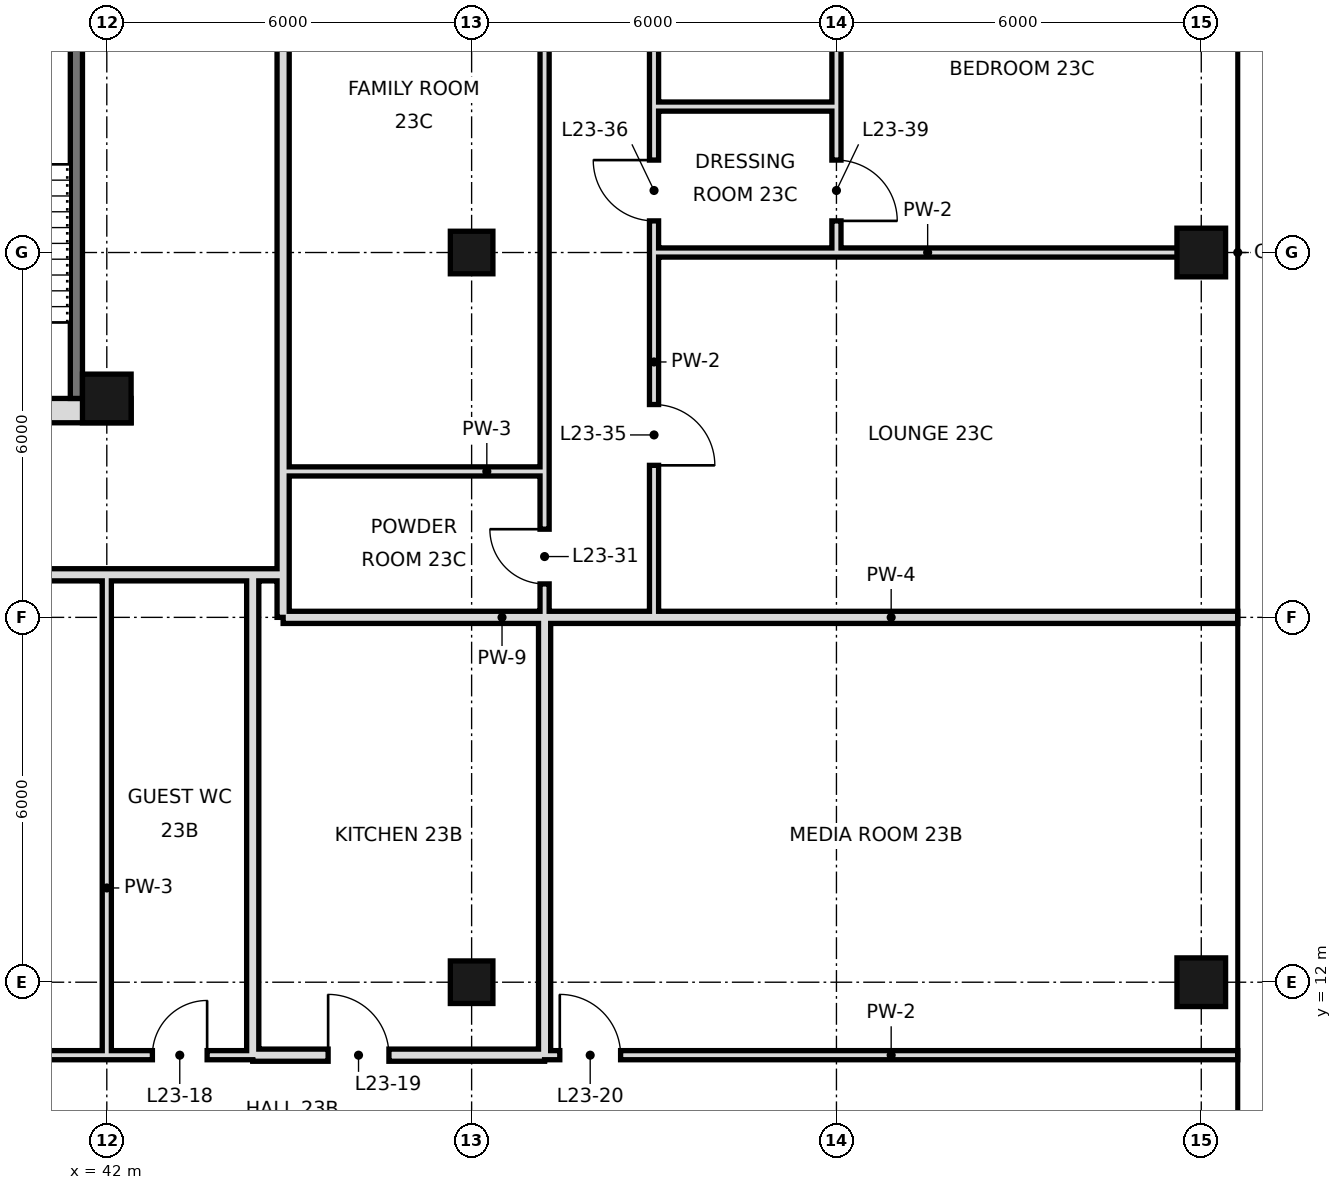
"""IFC4 building model, lengths in metres.
Left out: names, types, materials, properties, quantities, classifications, styles, units other than length and angle.
Written with IfcOpenShell. Run it as: python <this file> out.ifc"""

import sys

from ifc_helpers import new_model, si_unit, direction, frame, frame_2d, origin, origin_2d, place, context, subcontext, project, spatial, rectangle, hollow_rectangle, extrude, element, fill, save


model = new_model("IFC4")
c1 = context("Model", 3, precision=1e-05, world=origin(), true_north=direction((0.0, 1.0)))
c2 = subcontext(c1, "Body", "Model", "MODEL_VIEW")
j1 = project(units=[si_unit("LENGTHUNIT", "METRE"), si_unit("PLANEANGLEUNIT", "RADIAN")], contexts=[c1])
p1 = place(None, origin())
s1 = spatial("IfcSite", under=j1, at=p1, CompositionType="ELEMENT")
p2 = place(p1, origin())
s2 = spatial("IfcBuilding", under=s1, at=p2, CompositionType="ELEMENT")
p3 = place(p2, frame((0.0, 0.0, 107.0)))
s3 = spatial("IfcBuildingStorey", under=s2, at=p3, CompositionType="ELEMENT", Elevation=107.0)
p4 = place(p3, frame((42.0, 21.6, 0.0), z_axis=(0.0, 0.0, 1.0), x_axis=(1.0, 0.0, 0.0)))
e1 = element("IfcColumn", 1, at=p4, inside=s3, PredefinedType="COLUMN", context=c2, shape_type="SweptSolid", body=[
    extrude(hollow_rectangle(XDim=0.8, YDim=0.8, WallThickness=0.05, at=origin_2d()), origin(), (0.0, 0.0, 1.0), 3.6),
])
for number, where, z_axis, x_axis in (
    (2, (48.0, 12.0, 0.0), (0.0, 0.0, 1.0), (1.0, 0.0, 0.0)),
    (3, (48.0, 24.0, 0.0), (0.0, 0.0, 1.0), (1.0, 0.0, 0.0)),
):
    element("IfcColumn", number, at=place(p3, frame(where, z_axis=z_axis, x_axis=x_axis)), inside=s3, PredefinedType="COLUMN", context=c2, shape_type="SweptSolid", body=[
        extrude(hollow_rectangle(XDim=0.7, YDim=0.7, WallThickness=0.036, at=origin_2d()), origin(), (0.0, 0.0, 1.0), 3.6),
    ])
for number, where, z_axis, x_axis in (
    (4, (60.0, 12.0, 0.0), (0.0, 0.0, 1.0), (1.0, 0.0, 0.0)),
    (5, (60.0, 24.0, 0.0), (0.0, 0.0, 1.0), (1.0, 0.0, 0.0)),
):
    element("IfcColumn", number, at=place(p3, frame(where, z_axis=z_axis, x_axis=x_axis)), inside=s3, PredefinedType="COLUMN", context=c2, shape_type="SweptSolid", body=[
        extrude(hollow_rectangle(XDim=0.8, YDim=0.8, WallThickness=0.04, at=origin_2d()), origin(), (0.0, 0.0, 1.0), 3.6),
    ])
p5 = place(p3, frame((42.0, 10.8, 0.0), z_axis=(0.0, 0.0, 1.0), x_axis=(0.0, 1.0, 0.0)))
e6 = element("IfcWall", 6, at=p5, inside=s3, PredefinedType="PARTITIONING", context=c2, shape_type="SweptSolid", body=[
    extrude(rectangle(XDim=7.9, YDim=0.15, at=frame_2d((3.95, 0.0))), origin(), (0.0, 0.0, 1.0), 2.72),
])
p6 = place(p3, frame((44.4, 10.8, 0.0), z_axis=(0.0, 0.0, 1.0), x_axis=(0.0, 1.0, 0.0)))
e7 = element("IfcWall", 7, at=p6, inside=s3, PredefinedType="SOLIDWALL", context=c2, shape_type="SweptSolid", body=[
    extrude(rectangle(XDim=7.9, YDim=0.2, at=frame_2d((3.95, 0.0))), origin(), (0.0, 0.0, 1.0), 2.72),
])
p7 = place(p3, frame((44.9, 18.7, 0.0), z_axis=(0.0, 0.0, 1.0), x_axis=(0.0, 1.0, 0.0)))
e8 = element("IfcWall", 8, at=p7, inside=s3, PredefinedType="SOLIDWALL", context=c2, shape_type="SweptSolid", body=[
    extrude(rectangle(XDim=19.7, YDim=0.2, at=frame_2d((9.85, 0.0))), origin(), (0.0, 0.0, 1.0), 2.97),
])
p8 = place(p7, frame((16.96, 0.0, 0.0)))
e9 = element("IfcOpeningElement", 9, at=p8, cuts=e8, PredefinedType="OPENING", context=c2, shape_type="SweptSolid", body=[
    extrude(rectangle(XDim=1.2, YDim=2.4, at=frame_2d((0.6, 1.2))), frame((0.0, 0.11, 0.0), z_axis=(0.0, -1.0, 0.0), x_axis=(1.0, 0.0, 0.0)), (0.0, 0.0, 1.0), 0.22),
])
p9 = place(p3, frame((44.9, 18.0, 0.0), z_axis=(0.0, 0.0, 1.0), x_axis=(0.0, 1.0, 0.0)))
e10 = element("IfcWall", 10, at=p9, inside=s3, PredefinedType="SOLIDWALL", context=c2, shape_type="SweptSolid", body=[
    extrude(rectangle(XDim=0.7, YDim=0.2, at=frame_2d((0.35, 0.0))), origin(), (0.0, 0.0, 1.0), 2.97),
])
p10 = place(p3, frame((49.2, 10.8, 0.0), z_axis=(0.0, 0.0, 1.0), x_axis=(0.0, 1.0, 0.0)))
e11 = element("IfcWall", 11, at=p10, inside=s3, PredefinedType="SOLIDWALL", context=c2, shape_type="SweptSolid", body=[
    extrude(rectangle(XDim=7.2, YDim=0.2, at=frame_2d((3.6, 0.0))), origin(), (0.0, 0.0, 1.0), 2.72),
])
p11 = place(p3, frame((49.2, 20.4, 0.0), z_axis=(0.0, 0.0, 1.0), x_axis=(0.0, 1.0, 0.0)))
e12 = element("IfcWall", 12, at=p11, inside=s3, PredefinedType="PARTITIONING", context=c2, shape_type="SweptSolid", body=[
    extrude(rectangle(XDim=18.0, YDim=0.15, at=frame_2d((9.0, 0.0))), origin(), (0.0, 0.0, 1.0), 3.42),
])
p12 = place(p11, frame((13.6, 0.0, 0.0)))
e13 = element("IfcOpeningElement", 13, at=p12, cuts=e12, PredefinedType="OPENING", context=c2, shape_type="SweptSolid", body=[
    extrude(rectangle(XDim=1.0, YDim=2.4, at=frame_2d((0.5, 1.2))), frame((0.0, 0.085, 0.0), z_axis=(0.0, -1.0, 0.0), x_axis=(1.0, 0.0, 0.0)), (0.0, 0.0, 1.0), 0.17),
])
p13 = place(p11, frame((7.6, 0.0, 0.0)))
e14 = element("IfcOpeningElement", 14, at=p13, cuts=e12, PredefinedType="OPENING", context=c2, shape_type="SweptSolid", body=[
    extrude(rectangle(XDim=1.0, YDim=2.4, at=frame_2d((0.5, 1.2))), frame((0.0, 0.085, 0.0), z_axis=(0.0, -1.0, 0.0), x_axis=(1.0, 0.0, 0.0)), (0.0, 0.0, 1.0), 0.17),
])
p14 = place(p3, frame((49.2, 18.0, 0.0), z_axis=(0.0, 0.0, 1.0), x_axis=(0.0, 1.0, 0.0)))
e15 = element("IfcWall", 15, at=p14, inside=s3, PredefinedType="PARTITIONING", context=c2, shape_type="SweptSolid", body=[
    extrude(rectangle(XDim=2.4, YDim=0.15, at=frame_2d((1.2, 0.0))), origin(), (0.0, 0.0, 1.0), 3.42),
])
p15 = place(p14, frame((0.55, 0.0, 0.0)))
e16 = element("IfcOpeningElement", 16, at=p15, cuts=e15, PredefinedType="OPENING", context=c2, shape_type="SweptSolid", body=[
    extrude(rectangle(XDim=0.9, YDim=2.4, at=frame_2d((0.45, 1.2))), frame((0.0, 0.085, 0.0), z_axis=(0.0, -1.0, 0.0), x_axis=(1.0, 0.0, 0.0)), (0.0, 0.0, 1.0), 0.17),
])
p16 = place(p3, frame((51.0, 18.0, 0.0), z_axis=(0.0, 0.0, 1.0), x_axis=(0.0, 1.0, 0.0)))
e17 = element("IfcWall", 17, at=p16, inside=s3, PredefinedType="PARTITIONING", context=c2, shape_type="SweptSolid", body=[
    extrude(rectangle(XDim=8.4, YDim=0.15, at=frame_2d((4.2, 0.0))), origin(), (0.0, 0.0, 1.0), 3.42),
])
p17 = place(p16, frame((2.5, 0.0, 0.0)))
e18 = element("IfcOpeningElement", 18, at=p17, cuts=e17, PredefinedType="OPENING", context=c2, shape_type="SweptSolid", body=[
    extrude(rectangle(XDim=1.0, YDim=2.4, at=frame_2d((0.5, 1.2))), frame((0.0, 0.085, 0.0), z_axis=(0.0, -1.0, 0.0), x_axis=(1.0, 0.0, 0.0)), (0.0, 0.0, 1.0), 0.17),
])
p18 = place(p16, frame((6.52, 0.0, 0.0)))
e19 = element("IfcOpeningElement", 19, at=p18, cuts=e17, PredefinedType="OPENING", context=c2, shape_type="SweptSolid", body=[
    extrude(rectangle(XDim=1.0, YDim=2.4, at=frame_2d((0.5, 1.2))), frame((0.0, 0.085, 0.0), z_axis=(0.0, -1.0, 0.0), x_axis=(1.0, 0.0, 0.0)), (0.0, 0.0, 1.0), 0.17),
])
p19 = place(p3, frame((51.0, 26.4, 0.0), z_axis=(0.0, 0.0, 1.0), x_axis=(0.0, 1.0, 0.0)))
e20 = element("IfcWall", 20, at=p19, inside=s3, PredefinedType="PARTITIONING", context=c2, shape_type="SweptSolid", body=[
    extrude(rectangle(XDim=6.0, YDim=0.15, at=frame_2d((3.0, 0.0))), origin(), (0.0, 0.0, 1.0), 3.42),
])
p20 = place(p3, frame((54.0, 24.0, 0.0), z_axis=(0.0, 0.0, 1.0), x_axis=(0.0, 1.0, 0.0)))
e21 = element("IfcWall", 21, at=p20, inside=s3, PredefinedType="PARTITIONING", context=c2, shape_type="SweptSolid", body=[
    extrude(rectangle(XDim=2.4, YDim=0.15, at=frame_2d((1.2, 0.0))), origin(), (0.0, 0.0, 1.0), 3.42),
])
p21 = place(p20, frame((0.52, 0.0, 0.0)))
e22 = element("IfcOpeningElement", 22, at=p21, cuts=e21, PredefinedType="OPENING", context=c2, shape_type="SweptSolid", body=[
    extrude(rectangle(XDim=1.0, YDim=2.4, at=frame_2d((0.5, 1.2))), frame((0.0, 0.085, 0.0), z_axis=(0.0, -1.0, 0.0), x_axis=(1.0, 0.0, 0.0)), (0.0, 0.0, 1.0), 0.17),
])
p22 = place(p3, frame((54.0, 26.4, 0.0), z_axis=(0.0, 0.0, 1.0), x_axis=(0.0, 1.0, 0.0)))
e23 = element("IfcWall", 23, at=p22, inside=s3, PredefinedType="PARTITIONING", context=c2, shape_type="SweptSolid", body=[
    extrude(rectangle(XDim=6.0, YDim=0.15, at=frame_2d((3.0, 0.0))), origin(), (0.0, 0.0, 1.0), 3.42),
])
p23 = place(p22, frame((1.79, 0.0, 0.0)))
e24 = element("IfcOpeningElement", 24, at=p23, cuts=e23, PredefinedType="OPENING", context=c2, shape_type="SweptSolid", body=[
    extrude(rectangle(XDim=0.9, YDim=2.4, at=frame_2d((0.45, 1.2))), frame((0.0, 0.085, 0.0), z_axis=(0.0, -1.0, 0.0), x_axis=(1.0, 0.0, 0.0)), (0.0, 0.0, 1.0), 0.17),
])
p24 = place(p22, frame((4.35, 0.0, 0.0)))
e25 = element("IfcOpeningElement", 25, at=p24, cuts=e23, PredefinedType="OPENING", context=c2, shape_type="SweptSolid", body=[
    extrude(rectangle(XDim=0.9, YDim=2.4, at=frame_2d((0.45, 1.2))), frame((0.0, 0.085, 0.0), z_axis=(0.0, -1.0, 0.0), x_axis=(1.0, 0.0, 0.0)), (0.0, 0.0, 1.0), 0.17),
])
p25 = place(p3, frame((44.4, 10.8, 0.0), z_axis=(0.0, 0.0, 1.0), x_axis=(1.0, 0.0, 0.0)))
e26 = element("IfcWall", 26, at=p25, inside=s3, PredefinedType="SOLIDWALL", context=c2, shape_type="SweptSolid", body=[
    extrude(rectangle(XDim=4.8, YDim=0.2, at=frame_2d((2.4, 0.0))), origin(), (0.0, 0.0, 1.0), 2.72),
])
p26 = place(p25, frame((1.24, 0.0, 0.0)))
e27 = element("IfcOpeningElement", 27, at=p26, cuts=e26, PredefinedType="OPENING", context=c2, shape_type="SweptSolid", body=[
    extrude(rectangle(XDim=1.0, YDim=2.4, at=frame_2d((0.5, 1.2))), frame((0.0, 0.11, 0.0), z_axis=(0.0, -1.0, 0.0), x_axis=(1.0, 0.0, 0.0)), (0.0, 0.0, 1.0), 0.22),
])
p27 = place(p3, frame((24.0, 10.8, 0.0), z_axis=(0.0, 0.0, 1.0), x_axis=(1.0, 0.0, 0.0)))
e28 = element("IfcWall", 28, at=p27, inside=s3, PredefinedType="PARTITIONING", context=c2, shape_type="SweptSolid", body=[
    extrude(rectangle(XDim=18.0, YDim=0.15, at=frame_2d((9.0, 0.0))), origin(), (0.0, 0.0, 1.0), 3.42),
])
p28 = place(p27, frame((2.5, 0.0, 0.0)))
e29 = element("IfcOpeningElement", 29, at=p28, cuts=e28, PredefinedType="OPENING", context=c2, shape_type="SweptSolid", body=[
    extrude(rectangle(XDim=1.0, YDim=2.4, at=frame_2d((0.5, 1.2))), frame((0.0, 0.085, 0.0), z_axis=(0.0, -1.0, 0.0), x_axis=(1.0, 0.0, 0.0)), (0.0, 0.0, 1.0), 0.17),
])
p29 = place(p27, frame((15.4, 0.0, 0.0)))
e30 = element("IfcOpeningElement", 30, at=p29, cuts=e28, PredefinedType="OPENING", context=c2, shape_type="SweptSolid", body=[
    extrude(rectangle(XDim=1.0, YDim=2.4, at=frame_2d((0.5, 1.2))), frame((0.0, 0.085, 0.0), z_axis=(0.0, -1.0, 0.0), x_axis=(1.0, 0.0, 0.0)), (0.0, 0.0, 1.0), 0.17),
])
p30 = place(p27, frame((8.55, 0.0, 0.0)))
e31 = element("IfcOpeningElement", 31, at=p30, cuts=e28, PredefinedType="OPENING", context=c2, shape_type="SweptSolid", body=[
    extrude(rectangle(XDim=0.9, YDim=2.1, at=frame_2d((0.45, 1.05))), frame((0.0, 0.085, 0.0), z_axis=(0.0, -1.0, 0.0), x_axis=(1.0, 0.0, 0.0)), (0.0, 0.0, 1.0), 0.17),
])
p31 = place(p3, frame((49.2, 10.8, 0.0), z_axis=(0.0, 0.0, 1.0), x_axis=(1.0, 0.0, 0.0)))
e32 = element("IfcWall", 32, at=p31, inside=s3, PredefinedType="PARTITIONING", context=c2, shape_type="SweptSolid", body=[
    extrude(rectangle(XDim=11.4, YDim=0.15, at=frame_2d((5.7, 0.0))), origin(), (0.0, 0.0, 1.0), 3.42),
])
p32 = place(p31, frame((0.25, 0.0, 0.0)))
e33 = element("IfcOpeningElement", 33, at=p32, cuts=e32, PredefinedType="OPENING", context=c2, shape_type="SweptSolid", body=[
    extrude(rectangle(XDim=1.0, YDim=2.4, at=frame_2d((0.5, 1.2))), frame((0.0, 0.085, 0.0), z_axis=(0.0, -1.0, 0.0), x_axis=(1.0, 0.0, 0.0)), (0.0, 0.0, 1.0), 0.17),
])
p33 = place(p3, frame((42.0, 10.8, 0.0), z_axis=(0.0, 0.0, 1.0), x_axis=(1.0, 0.0, 0.0)))
e34 = element("IfcWall", 34, at=p33, inside=s3, PredefinedType="PARTITIONING", context=c2, shape_type="SweptSolid", body=[
    extrude(rectangle(XDim=2.4, YDim=0.15, at=frame_2d((1.2, 0.0))), origin(), (0.0, 0.0, 1.0), 3.42),
])
p34 = place(p33, frame((0.75, 0.0, 0.0)))
e35 = element("IfcOpeningElement", 35, at=p34, cuts=e34, PredefinedType="OPENING", context=c2, shape_type="SweptSolid", body=[
    extrude(rectangle(XDim=0.9, YDim=2.4, at=frame_2d((0.45, 1.2))), frame((0.0, 0.085, 0.0), z_axis=(0.0, -1.0, 0.0), x_axis=(1.0, 0.0, 0.0)), (0.0, 0.0, 1.0), 0.17),
])
p35 = place(p3, frame((44.9, 18.0, 0.0), z_axis=(0.0, 0.0, 1.0), x_axis=(1.0, 0.0, 0.0)))
e36 = element("IfcWall", 36, at=p35, inside=s3, PredefinedType="SOLIDWALL", context=c2, shape_type="SweptSolid", body=[
    extrude(rectangle(XDim=4.3, YDim=0.2, at=frame_2d((2.15, 0.0))), origin(), (0.0, 0.0, 1.0), 2.72),
])
p36 = place(p3, frame((49.2, 18.0, 0.0), z_axis=(0.0, 0.0, 1.0), x_axis=(1.0, 0.0, 0.0)))
e37 = element("IfcWall", 37, at=p36, inside=s3, PredefinedType="SOLIDWALL", context=c2, shape_type="SweptSolid", body=[
    extrude(rectangle(XDim=11.4, YDim=0.2, at=frame_2d((5.7, 0.0))), origin(), (0.0, 0.0, 1.0), 2.72),
])
p37 = place(p3, frame((21.6, 18.7, 0.0), z_axis=(0.0, 0.0, 1.0), x_axis=(1.0, 0.0, 0.0)))
e38 = element("IfcWall", 38, at=p37, inside=s3, PredefinedType="SOLIDWALL", context=c2, shape_type="SweptSolid", body=[
    extrude(rectangle(XDim=22.8, YDim=0.2, at=frame_2d((11.4, 0.0))), origin(), (0.0, 0.0, 1.0), 2.72),
])
p38 = place(p37, frame((4.8, 0.0, 0.0)))
e39 = element("IfcOpeningElement", 39, at=p38, cuts=e38, PredefinedType="OPENING", context=c2, shape_type="SweptSolid", body=[
    extrude(rectangle(XDim=1.2, YDim=2.4, at=frame_2d((0.6, 1.2))), frame((0.0, 0.11, 0.0), z_axis=(0.0, -1.0, 0.0), x_axis=(1.0, 0.0, 0.0)), (0.0, 0.0, 1.0), 0.22),
])
p39 = place(p37, frame((16.8, 0.0, 0.0)))
e40 = element("IfcOpeningElement", 40, at=p39, cuts=e38, PredefinedType="OPENING", context=c2, shape_type="SweptSolid", body=[
    extrude(rectangle(XDim=1.2, YDim=2.4, at=frame_2d((0.6, 1.2))), frame((0.0, 0.11, 0.0), z_axis=(0.0, -1.0, 0.0), x_axis=(1.0, 0.0, 0.0)), (0.0, 0.0, 1.0), 0.22),
])
p40 = place(p3, frame((44.4, 18.7, 0.0), z_axis=(0.0, 0.0, 1.0), x_axis=(1.0, 0.0, 0.0)))
e41 = element("IfcWall", 41, at=p40, inside=s3, PredefinedType="SOLIDWALL", context=c2, shape_type="SweptSolid", body=[
    extrude(rectangle(XDim=0.5, YDim=0.2, at=frame_2d((0.25, 0.0))), origin(), (0.0, 0.0, 1.0), 3.42),
])
p41 = place(p3, frame((44.9, 20.4, 0.0), z_axis=(0.0, 0.0, 1.0), x_axis=(1.0, 0.0, 0.0)))
e42 = element("IfcWall", 42, at=p41, inside=s3, PredefinedType="PARTITIONING", context=c2, shape_type="SweptSolid", body=[
    extrude(rectangle(XDim=4.3, YDim=0.15, at=frame_2d((2.15, 0.0))), origin(), (0.0, 0.0, 1.0), 3.42),
])
p42 = place(p3, frame((51.0, 24.0, 0.0), z_axis=(0.0, 0.0, 1.0), x_axis=(1.0, 0.0, 0.0)))
e43 = element("IfcWall", 43, at=p42, inside=s3, PredefinedType="PARTITIONING", context=c2, shape_type="SweptSolid", body=[
    extrude(rectangle(XDim=9.0, YDim=0.15, at=frame_2d((4.5, 0.0))), origin(), (0.0, 0.0, 1.0), 2.72),
])
p43 = place(p3, frame((51.0, 26.4, 0.0), z_axis=(0.0, 0.0, 1.0), x_axis=(1.0, 0.0, 0.0)))
e44 = element("IfcWall", 44, at=p43, inside=s3, PredefinedType="PARTITIONING", context=c2, shape_type="SweptSolid", body=[
    extrude(rectangle(XDim=3.0, YDim=0.15, at=frame_2d((1.5, 0.0))), origin(), (0.0, 0.0, 1.0), 3.42),
])
p44 = place(p3, frame((41.5, 21.6, 0.0), z_axis=(0.0, 0.0, 1.0), x_axis=(0.0, 1.0, 0.0)))
e45 = element("IfcWall", 45, at=p44, inside=s3, PredefinedType="SOLIDWALL", context=c2, shape_type="SweptSolid", body=[
    extrude(rectangle(XDim=23.5, YDim=0.2, at=frame_2d((11.75, 0.0))), origin(), (0.0, 0.0, 1.0), 3.42),
])
p45 = place(p3, frame((5.6, 21.4, 0.0), z_axis=(0.0, 0.0, 1.0), x_axis=(1.0, 0.0, 0.0)))
e46 = element("IfcWall", 46, at=p45, inside=s3, PredefinedType="SOLIDWALL", context=c2, shape_type="SweptSolid", body=[
    extrude(rectangle(XDim=36.8, YDim=0.4, at=frame_2d((18.4, 0.0))), origin(), (0.0, 0.0, 1.0), 3.42),
])
p46 = place(p45, frame((8.5, 0.0, 0.0)))
e47 = element("IfcOpeningElement", 47, at=p46, cuts=e46, PredefinedType="OPENING", context=c2, shape_type="SweptSolid", body=[
    extrude(rectangle(XDim=1.8, YDim=2.1, at=frame_2d((0.9, 1.05))), frame((0.0, 0.21, 0.0), z_axis=(0.0, -1.0, 0.0), x_axis=(1.0, 0.0, 0.0)), (0.0, 0.0, 1.0), 0.42),
])
p47 = place(p45, frame((17.5, 0.0, 0.0)))
e48 = element("IfcOpeningElement", 48, at=p47, cuts=e46, PredefinedType="OPENING", context=c2, shape_type="SweptSolid", body=[
    extrude(rectangle(XDim=1.8, YDim=2.1, at=frame_2d((0.9, 1.05))), frame((0.0, 0.21, 0.0), z_axis=(0.0, -1.0, 0.0), x_axis=(1.0, 0.0, 0.0)), (0.0, 0.0, 1.0), 0.42),
])
p48 = place(p45, frame((26.5, 0.0, 0.0)))
e49 = element("IfcOpeningElement", 49, at=p48, cuts=e46, PredefinedType="OPENING", context=c2, shape_type="SweptSolid", body=[
    extrude(rectangle(XDim=1.8, YDim=2.1, at=frame_2d((0.9, 1.05))), frame((0.0, 0.21, 0.0), z_axis=(0.0, -1.0, 0.0), x_axis=(1.0, 0.0, 0.0)), (0.0, 0.0, 1.0), 0.42),
])
p49 = place(p45, frame((4.5, 0.0, 0.0)))
e50 = element("IfcOpeningElement", 50, at=p49, cuts=e46, PredefinedType="OPENING", context=c2, shape_type="SweptSolid", body=[
    extrude(rectangle(XDim=1.2, YDim=2.1, at=frame_2d((0.6, 1.05))), frame((0.0, 0.21, 0.0), z_axis=(0.0, -1.0, 0.0), x_axis=(1.0, 0.0, 0.0)), (0.0, 0.0, 1.0), 0.42),
])
p50 = place(p45, frame((31.1, 0.0, 0.0)))
e51 = element("IfcOpeningElement", 51, at=p50, cuts=e46, PredefinedType="OPENING", context=c2, shape_type="SweptSolid", body=[
    extrude(rectangle(XDim=1.2, YDim=2.1, at=frame_2d((0.6, 1.05))), frame((0.0, 0.21, 0.0), z_axis=(0.0, -1.0, 0.0), x_axis=(1.0, 0.0, 0.0)), (0.0, 0.0, 1.0), 0.42),
])
p51 = place(p34, frame((0.9, 0.0, 0.0), z_axis=(0.0, 0.0, 1.0), x_axis=(-1.0, 0.0, 0.0)))
e52 = element("IfcDoor", 52, at=p51, inside=s3, OperationType="SINGLE_SWING_LEFT", PredefinedType="DOOR", context=c2, shape_type="SweptSolid", body=[
    extrude(rectangle(XDim=0.9, YDim=2.4, at=frame_2d((0.45, 1.2))), frame((0.0, 0.025, 0.0), z_axis=(0.0, -1.0, 0.0), x_axis=(1.0, 0.0, 0.0)), (0.0, 0.0, 1.0), 0.05),
])
fill(e35, e52)
p52 = place(p26, origin())
e53 = element("IfcDoor", 53, at=p52, inside=s3, OperationType="SINGLE_SWING_LEFT", PredefinedType="DOOR", context=c2, shape_type="SweptSolid", body=[
    extrude(rectangle(XDim=1.0, YDim=2.4, at=frame_2d((0.5, 1.2))), frame((0.0, 0.025, 0.0), z_axis=(0.0, -1.0, 0.0), x_axis=(1.0, 0.0, 0.0)), (0.0, 0.0, 1.0), 0.05),
])
fill(e27, e53)
p53 = place(p32, origin())
e54 = element("IfcDoor", 54, at=p53, inside=s3, OperationType="SINGLE_SWING_LEFT", PredefinedType="DOOR", context=c2, shape_type="SweptSolid", body=[
    extrude(rectangle(XDim=1.0, YDim=2.4, at=frame_2d((0.5, 1.2))), frame((0.0, 0.025, 0.0), z_axis=(0.0, -1.0, 0.0), x_axis=(1.0, 0.0, 0.0)), (0.0, 0.0, 1.0), 0.05),
])
fill(e33, e54)
p54 = place(p15, frame((0.9, 0.0, 0.0), z_axis=(0.0, 0.0, 1.0), x_axis=(-1.0, 0.0, 0.0)))
e55 = element("IfcDoor", 55, at=p54, inside=s3, OperationType="SINGLE_SWING_LEFT", PredefinedType="DOOR", context=c2, shape_type="SweptSolid", body=[
    extrude(rectangle(XDim=0.9, YDim=2.4, at=frame_2d((0.45, 1.2))), frame((0.0, 0.025, 0.0), z_axis=(0.0, -1.0, 0.0), x_axis=(1.0, 0.0, 0.0)), (0.0, 0.0, 1.0), 0.05),
])
fill(e16, e55)
p55 = place(p17, frame((1.0, 0.0, 0.0), z_axis=(0.0, 0.0, 1.0), x_axis=(-1.0, 0.0, 0.0)))
e56 = element("IfcDoor", 56, at=p55, inside=s3, OperationType="SINGLE_SWING_RIGHT", PredefinedType="DOOR", context=c2, shape_type="SweptSolid", body=[
    extrude(rectangle(XDim=1.0, YDim=2.4, at=frame_2d((0.5, 1.2))), frame((0.0, 0.025, 0.0), z_axis=(0.0, -1.0, 0.0), x_axis=(1.0, 0.0, 0.0)), (0.0, 0.0, 1.0), 0.05),
])
fill(e18, e56)
p56 = place(p18, frame((1.0, 0.0, 0.0), z_axis=(0.0, 0.0, 1.0), x_axis=(-1.0, 0.0, 0.0)))
e57 = element("IfcDoor", 57, at=p56, inside=s3, OperationType="SINGLE_SWING_LEFT", PredefinedType="DOOR", context=c2, shape_type="SweptSolid", body=[
    extrude(rectangle(XDim=1.0, YDim=2.4, at=frame_2d((0.5, 1.2))), frame((0.0, 0.025, 0.0), z_axis=(0.0, -1.0, 0.0), x_axis=(1.0, 0.0, 0.0)), (0.0, 0.0, 1.0), 0.05),
])
fill(e19, e57)
p57 = place(p21, frame((1.0, 0.0, 0.0), z_axis=(0.0, 0.0, 1.0), x_axis=(-1.0, 0.0, 0.0)))
e58 = element("IfcDoor", 58, at=p57, inside=s3, OperationType="SINGLE_SWING_RIGHT", PredefinedType="DOOR", context=c2, shape_type="SweptSolid", body=[
    extrude(rectangle(XDim=1.0, YDim=2.4, at=frame_2d((0.5, 1.2))), frame((0.0, 0.025, 0.0), z_axis=(0.0, -1.0, 0.0), x_axis=(1.0, 0.0, 0.0)), (0.0, 0.0, 1.0), 0.05),
])
fill(e22, e58)
save(model, sys.argv[1])
